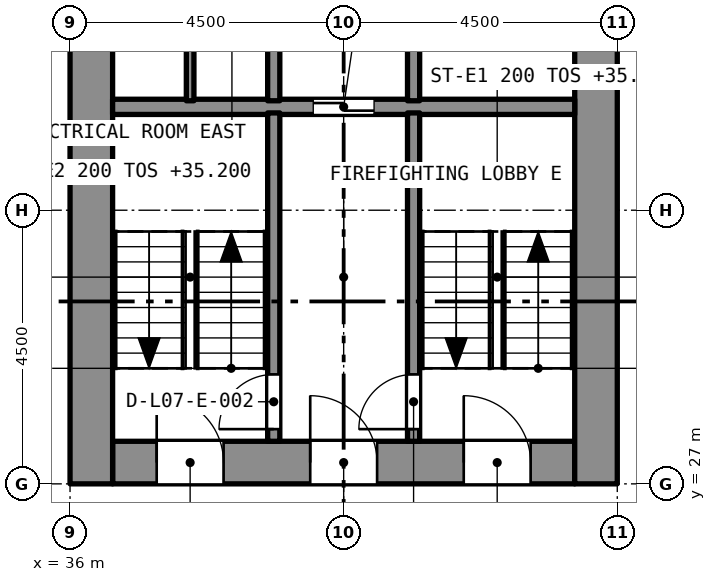
"""IFC4 building model, lengths in metres.
Left out: names, types, materials, properties, quantities, classifications, styles, units other than length and angle.
Written with IfcOpenShell. Run it as: python <this file> out.ifc"""

import sys

from ifc_helpers import new_model, si_unit, direction, frame, frame_2d, origin, place, context, subcontext, project, spatial, rectangle, extrude, element, fill, save


model = new_model("IFC4")
c1 = context("Model", 3, precision=1e-05, world=origin(), true_north=direction((0.0, 1.0)))
c2 = subcontext(c1, "Body", "Model", "MODEL_VIEW")
j1 = project(units=[si_unit("LENGTHUNIT", "METRE"), si_unit("PLANEANGLEUNIT", "RADIAN")], contexts=[c1])
p1 = place(None, origin())
s1 = spatial("IfcSite", under=j1, at=p1, CompositionType="ELEMENT")
p2 = place(p1, origin())
s2 = spatial("IfcBuilding", under=s1, at=p2, CompositionType="ELEMENT")
p3 = place(p2, frame((0.0, 0.0, 33.6)))
s3 = spatial("IfcBuildingStorey", under=s2, at=p3, CompositionType="ELEMENT", Elevation=33.6)
p4 = place(p3, frame((36.7, 27.35, 0.0), z_axis=(0.0, 0.0, 1.0), x_axis=(1.0, 0.0, 0.0)))
e1 = element("IfcWall", 1, at=p4, inside=s3, PredefinedType="SOLIDWALL", context=c2, shape_type="SweptSolid", body=[
    extrude(rectangle(XDim=7.6, YDim=0.7, at=frame_2d((3.8, 0.0))), origin(), (0.0, 0.0, 1.0), 3.2),
])
p5 = place(p4, frame((5.775, 0.0, 0.0)))
e2 = element("IfcOpeningElement", 2, at=p5, cuts=e1, PredefinedType="OPENING", context=c2, shape_type="SweptSolid", body=[
    extrude(rectangle(XDim=1.1, YDim=2.1, at=frame_2d((0.55, 1.05))), frame((0.0, 0.36, 0.0), z_axis=(0.0, -1.0, 0.0), x_axis=(1.0, 0.0, 0.0)), (0.0, 0.0, 1.0), 0.72),
])
p6 = place(p4, frame((3.25, 0.0, 0.0)))
e3 = element("IfcOpeningElement", 3, at=p6, cuts=e1, PredefinedType="OPENING", context=c2, shape_type="SweptSolid", body=[
    extrude(rectangle(XDim=1.1, YDim=2.1, at=frame_2d((0.55, 1.05))), frame((0.0, 0.36, 0.0), z_axis=(0.0, -1.0, 0.0), x_axis=(1.0, 0.0, 0.0)), (0.0, 0.0, 1.0), 0.72),
])
p7 = place(p4, frame((0.725, 0.0, 0.0)))
e4 = element("IfcOpeningElement", 4, at=p7, cuts=e1, PredefinedType="OPENING", context=c2, shape_type="SweptSolid", body=[
    extrude(rectangle(XDim=1.1, YDim=2.1, at=frame_2d((0.55, 1.05))), frame((0.0, 0.36, 0.0), z_axis=(0.0, -1.0, 0.0), x_axis=(1.0, 0.0, 0.0)), (0.0, 0.0, 1.0), 0.72),
])
p8 = place(p3, frame((36.35, 27.0, 0.0), z_axis=(0.0, 0.0, 1.0), x_axis=(0.0, 1.0, 0.0)))
e5 = element("IfcWall", 5, at=p8, inside=s3, PredefinedType="SOLIDWALL", context=c2, shape_type="SweptSolid", body=[
    extrude(rectangle(XDim=13.5, YDim=0.7, at=frame_2d((6.75, 0.0))), origin(), (0.0, 0.0, 1.0), 3.2),
])
p9 = place(p8, frame((8.95, 0.0, 0.0)))
e6 = element("IfcOpeningElement", 6, at=p9, cuts=e5, PredefinedType="OPENING", context=c2, shape_type="SweptSolid", body=[
    extrude(rectangle(XDim=1.2, YDim=2.1, at=frame_2d((0.6, 1.05))), frame((0.0, 0.36, 0.0), z_axis=(0.0, -1.0, 0.0), x_axis=(1.0, 0.0, 0.0)), (0.0, 0.0, 1.0), 0.72),
])
p10 = place(p3, frame((44.65, 27.0, 0.0), z_axis=(0.0, 0.0, 1.0), x_axis=(0.0, 1.0, 0.0)))
e7 = element("IfcWall", 7, at=p10, inside=s3, PredefinedType="SOLIDWALL", context=c2, shape_type="SweptSolid", body=[
    extrude(rectangle(XDim=13.5, YDim=0.7, at=frame_2d((6.75, 0.0))), origin(), (0.0, 0.0, 1.0), 3.2),
])
p11 = place(p10, frame((8.95, 0.0, 0.0)))
e8 = element("IfcOpeningElement", 8, at=p11, cuts=e7, PredefinedType="OPENING", context=c2, shape_type="SweptSolid", body=[
    extrude(rectangle(XDim=1.2, YDim=2.1, at=frame_2d((0.6, 1.05))), frame((0.0, 0.36, 0.0), z_axis=(0.0, -1.0, 0.0), x_axis=(1.0, 0.0, 0.0)), (0.0, 0.0, 1.0), 0.72),
])
p12 = place(p3, frame((36.7, 33.2, 0.0), z_axis=(0.0, 0.0, 1.0), x_axis=(1.0, 0.0, 0.0)))
e9 = element("IfcWall", 9, at=p12, inside=s3, PredefinedType="SOLIDWALL", context=c2, shape_type="SweptSolid", body=[
    extrude(rectangle(XDim=7.6, YDim=0.25, at=frame_2d((3.8, 0.0))), origin(), (0.0, 0.0, 1.0), 2.9),
])
p13 = place(p12, frame((3.3, 0.0, 0.0)))
e10 = element("IfcOpeningElement", 10, at=p13, cuts=e9, PredefinedType="OPENING", context=c2, shape_type="SweptSolid", body=[
    extrude(rectangle(XDim=1.0, YDim=2.1, at=frame_2d((0.5, 1.05))), frame((0.0, 0.135, 0.0), z_axis=(0.0, -1.0, 0.0), x_axis=(1.0, 0.0, 0.0)), (0.0, 0.0, 1.0), 0.27),
])
p14 = place(p3, frame((41.65, 27.7, 0.0), z_axis=(0.0, 0.0, 1.0), x_axis=(0.0, 1.0, 0.0)))
e11 = element("IfcWall", 11, at=p14, inside=s3, PredefinedType="SOLIDWALL", context=c2, shape_type="SweptSolid", body=[
    extrude(rectangle(XDim=5.4, YDim=0.2, at=frame_2d((2.7, 0.0))), origin(), (0.0, 0.0, 1.0), 2.9),
])
p15 = place(p14, frame((0.2, 0.0, 0.0)))
e12 = element("IfcOpeningElement", 12, at=p15, cuts=e11, PredefinedType="OPENING", context=c2, shape_type="SweptSolid", body=[
    extrude(rectangle(XDim=0.9, YDim=2.1, at=frame_2d((0.45, 1.05))), frame((0.0, 0.11, 0.0), z_axis=(0.0, -1.0, 0.0), x_axis=(1.0, 0.0, 0.0)), (0.0, 0.0, 1.0), 0.22),
])
p16 = place(p3, frame((39.35, 27.7, 0.0), z_axis=(0.0, 0.0, 1.0), x_axis=(0.0, 1.0, 0.0)))
e13 = element("IfcWall", 13, at=p16, inside=s3, PredefinedType="SOLIDWALL", context=c2, shape_type="SweptSolid", body=[
    extrude(rectangle(XDim=5.4, YDim=0.2, at=frame_2d((2.7, 0.0))), origin(), (0.0, 0.0, 1.0), 2.9),
])
p17 = place(p16, frame((0.2, 0.0, 0.0)))
e14 = element("IfcOpeningElement", 14, at=p17, cuts=e13, PredefinedType="OPENING", context=c2, shape_type="SweptSolid", body=[
    extrude(rectangle(XDim=0.9, YDim=2.1, at=frame_2d((0.45, 1.05))), frame((0.0, 0.11, 0.0), z_axis=(0.0, -1.0, 0.0), x_axis=(1.0, 0.0, 0.0)), (0.0, 0.0, 1.0), 0.22),
])
for number, where, z_axis, x_axis in (
    (15, (41.65, 33.3, 0.0), (0.0, 0.0, 1.0), (0.0, 1.0, 0.0)),
    (16, (39.35, 33.3, 0.0), (0.0, 0.0, 1.0), (0.0, 1.0, 0.0)),
):
    element("IfcWall", number, at=place(p3, frame(where, z_axis=z_axis, x_axis=x_axis)), inside=s3, PredefinedType="SOLIDWALL", context=c2, shape_type="SweptSolid", body=[
        extrude(rectangle(XDim=2.3, YDim=0.2, at=frame_2d((1.15, 0.0))), origin(), (0.0, 0.0, 1.0), 2.9),
    ])
p18 = place(p3, frame((37.975, 33.3, 0.0), z_axis=(0.0, 0.0, 1.0), x_axis=(0.0, 1.0, 0.0)))
e17 = element("IfcWall", 17, at=p18, inside=s3, PredefinedType="PARTITIONING", context=c2, shape_type="SweptSolid", body=[
    extrude(rectangle(XDim=2.3, YDim=0.125, at=frame_2d((1.15, 0.0))), origin(), (0.0, 0.0, 1.0), 2.9),
])
p19 = place(p15, origin())
e18 = element("IfcDoor", 18, at=p19, inside=s3, OperationType="SINGLE_SWING_LEFT", PredefinedType="DOOR", context=c2, shape_type="SweptSolid", body=[
    extrude(rectangle(XDim=0.9, YDim=2.1, at=frame_2d((0.45, 1.05))), frame((0.0, 0.025, 0.0), z_axis=(0.0, -1.0, 0.0), x_axis=(1.0, 0.0, 0.0)), (0.0, 0.0, 1.0), 0.05),
])
fill(e12, e18)
p20 = place(p17, origin())
e19 = element("IfcDoor", 19, at=p20, inside=s3, OperationType="SINGLE_SWING_LEFT", PredefinedType="DOOR", context=c2, shape_type="SweptSolid", body=[
    extrude(rectangle(XDim=0.9, YDim=2.1, at=frame_2d((0.45, 1.05))), frame((0.0, 0.025, 0.0), z_axis=(0.0, -1.0, 0.0), x_axis=(1.0, 0.0, 0.0)), (0.0, 0.0, 1.0), 0.05),
])
fill(e14, e19)
p21 = place(p13, origin())
e20 = element("IfcDoor", 20, at=p21, inside=s3, OperationType="SLIDING_TO_LEFT", PredefinedType="DOOR", context=c2, shape_type="SweptSolid", body=[
    extrude(rectangle(XDim=1.0, YDim=2.1, at=frame_2d((0.5, 1.05))), frame((0.0, 0.025, 0.0), z_axis=(0.0, -1.0, 0.0), x_axis=(1.0, 0.0, 0.0)), (0.0, 0.0, 1.0), 0.05),
])
fill(e10, e20)
p22 = place(p5, origin())
e21 = element("IfcDoor", 21, at=p22, inside=s3, OperationType="SINGLE_SWING_LEFT", PredefinedType="DOOR", context=c2, shape_type="SweptSolid", body=[
    extrude(rectangle(XDim=1.1, YDim=2.1, at=frame_2d((0.55, 1.05))), frame((0.0, 0.025, 0.0), z_axis=(0.0, -1.0, 0.0), x_axis=(1.0, 0.0, 0.0)), (0.0, 0.0, 1.0), 0.05),
])
fill(e2, e21)
p23 = place(p6, origin())
e22 = element("IfcDoor", 22, at=p23, inside=s3, OperationType="SINGLE_SWING_LEFT", PredefinedType="DOOR", context=c2, shape_type="SweptSolid", body=[
    extrude(rectangle(XDim=1.1, YDim=2.1, at=frame_2d((0.55, 1.05))), frame((0.0, 0.025, 0.0), z_axis=(0.0, -1.0, 0.0), x_axis=(1.0, 0.0, 0.0)), (0.0, 0.0, 1.0), 0.05),
])
fill(e3, e22)
p24 = place(p7, origin())
e23 = element("IfcDoor", 23, at=p24, inside=s3, OperationType="SINGLE_SWING_LEFT", PredefinedType="DOOR", context=c2, shape_type="SweptSolid", body=[
    extrude(rectangle(XDim=1.1, YDim=2.1, at=frame_2d((0.55, 1.05))), frame((0.0, 0.025, 0.0), z_axis=(0.0, -1.0, 0.0), x_axis=(1.0, 0.0, 0.0)), (0.0, 0.0, 1.0), 0.05),
])
fill(e4, e23)
save(model, sys.argv[1])
